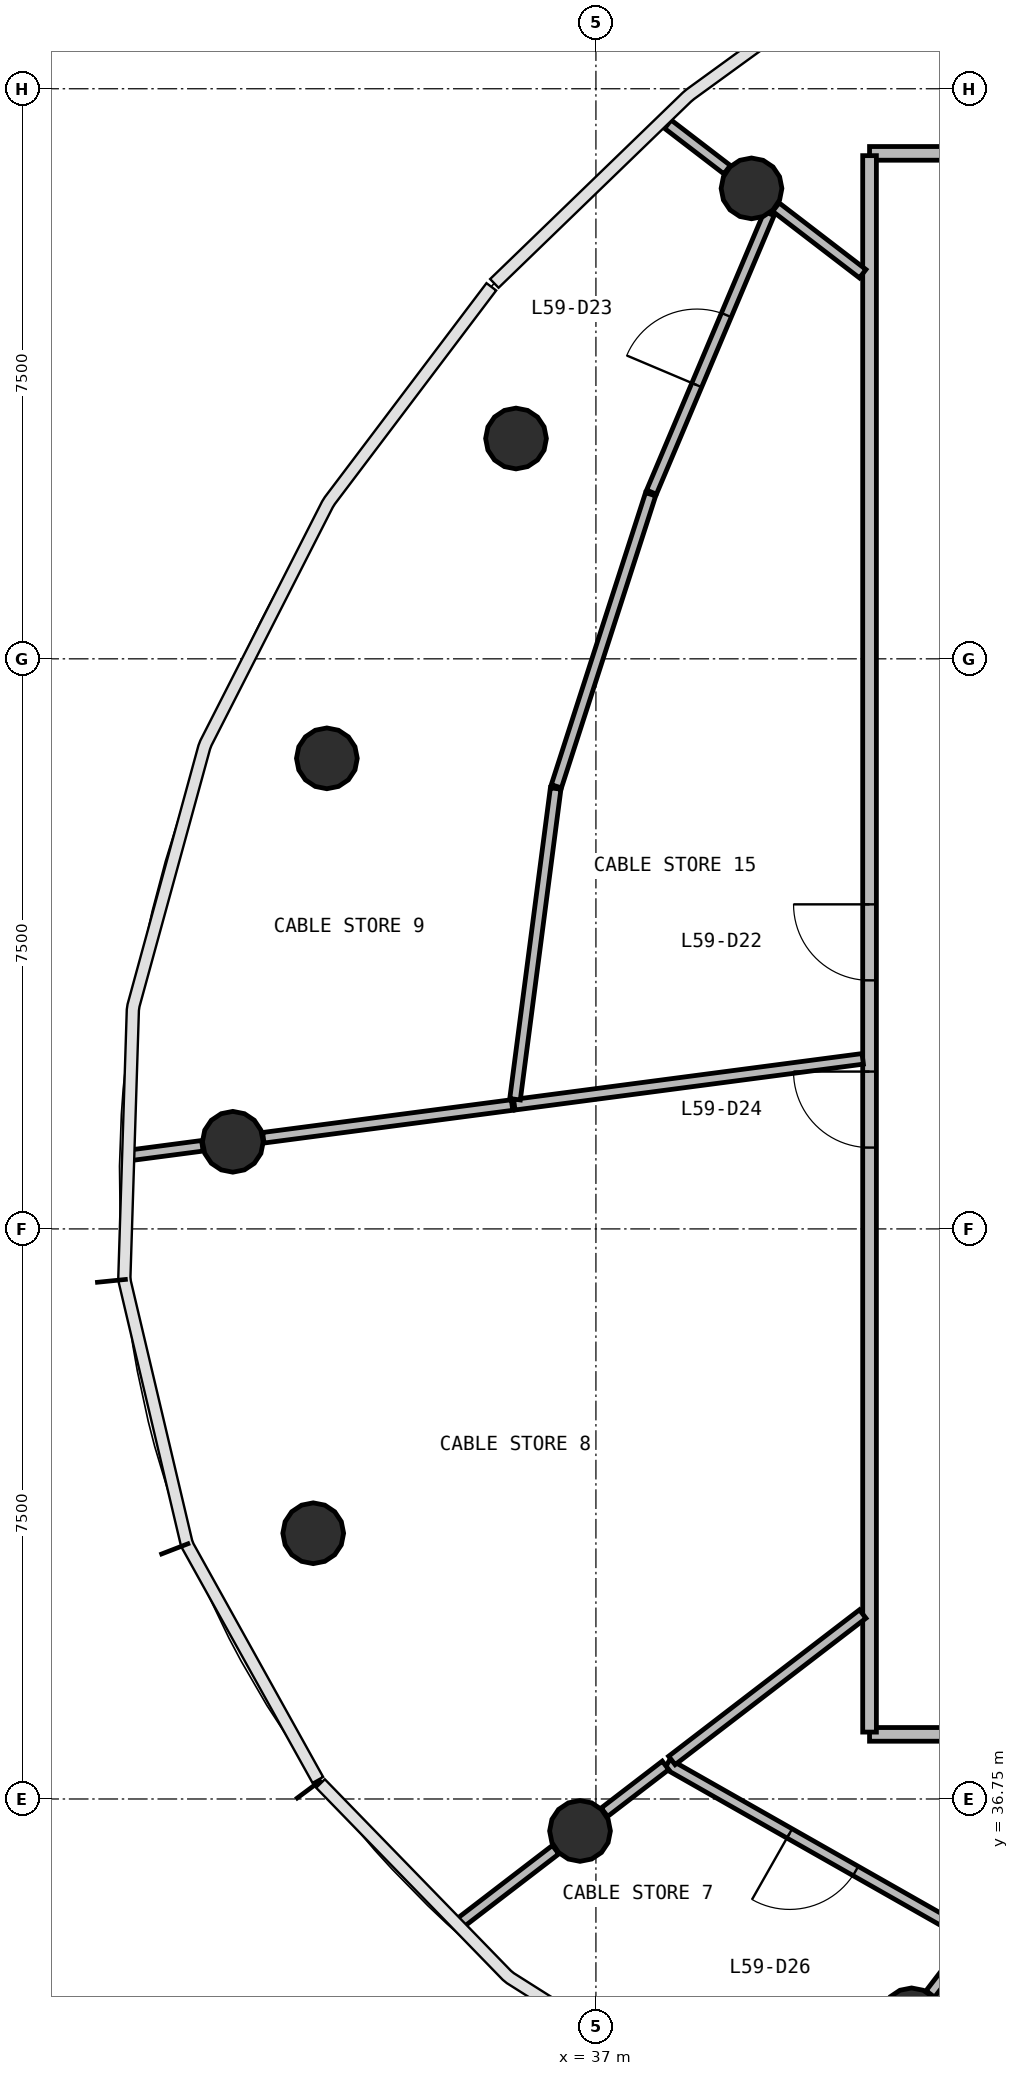
"""IFC4 building model, lengths in metres.
Left out: names, types, materials, properties, quantities, classifications, styles, units other than length and angle.
Written with IfcOpenShell. Run it as: python <this file> out.ifc"""

import sys

from ifc_helpers import new_model, si_unit, direction, frame, frame_2d, origin, origin_2d, place, context, subcontext, project, spatial, rectangle, circle, extrude, source, transform, mapped, element, fill, save


model = new_model("IFC4")
c1 = context("Model", 3, precision=1e-05, world=origin(), true_north=direction((0.0, 1.0)))
c2 = subcontext(c1, "Body", "Model", "MODEL_VIEW")
j1 = project(units=[si_unit("LENGTHUNIT", "METRE"), si_unit("PLANEANGLEUNIT", "RADIAN")], contexts=[c1])
p1 = place(None, origin())
s1 = spatial("IfcSite", under=j1, at=p1, CompositionType="ELEMENT")
p2 = place(p1, origin())
s2 = spatial("IfcBuilding", under=s1, at=p2, CompositionType="ELEMENT")
p3 = place(p2, frame((0.0, 0.0, 242.3)))
s3 = spatial("IfcBuildingStorey", under=s2, at=p3, CompositionType="ELEMENT", Elevation=242.3)
m1 = source(origin(), c2, "Body", "SweptSolid", [
    extrude(circle(Radius=0.4, at=origin_2d()), origin(), (0.0, 0.0, 1.0), 3.9),
])
for number, where, z_axis, x_axis in (
    (1, (39.047, 57.939, 0.0), (0.0, 0.0, 1.0), (1.0, 0.0, 0.0)),
    (2, (35.948, 54.649, 0.0), (0.0, 0.0, 1.0), (1.0, 0.0, 0.0)),
    (3, (33.46, 50.441, 0.0), (0.0, 0.0, 1.0), (1.0, 0.0, 0.0)),
    (4, (32.223, 45.396, 0.0), (0.0, 0.0, 1.0), (1.0, 0.0, 0.0)),
    (5, (33.281, 40.246, 0.0), (0.0, 0.0, 1.0), (1.0, 0.0, 0.0)),
    (6, (36.791, 36.329, 0.0), (0.0, 0.0, 1.0), (1.0, 0.0, 0.0)),
    (7, (41.153, 33.864, 0.0), (0.0, 0.0, 1.0), (1.0, 0.0, 0.0)),
):
    element("IfcColumn", number, at=place(p3, frame(where, z_axis=z_axis, x_axis=x_axis)), inside=s3, PredefinedType="COLUMN", context=c2, shape_type="MappedRepresentation", body=[
        mapped(m1, transform((0.0, 0.0, 0.0), scale=1.0)),
    ])
p4 = place(p3, frame((40.6, 58.4, 0.0), z_axis=(0.0, 0.0, 1.0), x_axis=(1.0, 0.0, 0.0)))
e8 = element("IfcWall", 8, at=p4, inside=s3, PredefinedType="PARTITIONING", context=c2, shape_type="SweptSolid", body=[
    extrude(rectangle(XDim=22.8, YDim=0.18, at=frame_2d((11.4, 0.0))), origin(), (0.0, 0.0, 1.0), 2.88),
])
p5 = place(p4, frame((10.85, 0.0, 0.0)))
e9 = element("IfcOpeningElement", 9, at=p5, cuts=e8, PredefinedType="OPENING", context=c2, shape_type="SweptSolid", body=[
    extrude(rectangle(XDim=0.9, YDim=2.1, at=frame_2d((0.45, 1.05))), frame((0.0, 0.1, 0.0), z_axis=(0.0, -1.0, 0.0), x_axis=(1.0, 0.0, 0.0)), (0.0, 0.0, 1.0), 0.2),
])
p6 = place(p4, frame((8.85, 0.0, 0.0)))
e10 = element("IfcOpeningElement", 10, at=p6, cuts=e8, PredefinedType="OPENING", context=c2, shape_type="SweptSolid", body=[
    extrude(rectangle(XDim=0.9, YDim=2.1, at=frame_2d((0.45, 1.05))), frame((0.0, 0.1, 0.0), z_axis=(0.0, -1.0, 0.0), x_axis=(1.0, 0.0, 0.0)), (0.0, 0.0, 1.0), 0.2),
])
p7 = place(p4, frame((5.75, 0.0, 0.0)))
e11 = element("IfcOpeningElement", 11, at=p7, cuts=e8, PredefinedType="OPENING", context=c2, shape_type="SweptSolid", body=[
    extrude(rectangle(XDim=1.0, YDim=2.1, at=frame_2d((0.5, 1.05))), frame((0.0, 0.1, 0.0), z_axis=(0.0, -1.0, 0.0), x_axis=(1.0, 0.0, 0.0)), (0.0, 0.0, 1.0), 0.2),
])
p8 = place(p4, frame((19.95, 0.0, 0.0)))
e12 = element("IfcOpeningElement", 12, at=p8, cuts=e8, PredefinedType="OPENING", context=c2, shape_type="SweptSolid", body=[
    extrude(rectangle(XDim=1.0, YDim=2.1, at=frame_2d((0.5, 1.05))), frame((0.0, 0.1, 0.0), z_axis=(0.0, -1.0, 0.0), x_axis=(1.0, 0.0, 0.0)), (0.0, 0.0, 1.0), 0.2),
])
p9 = place(p4, frame((12.95, 0.0, 0.0)))
e13 = element("IfcOpeningElement", 13, at=p9, cuts=e8, PredefinedType="OPENING", context=c2, shape_type="SweptSolid", body=[
    extrude(rectangle(XDim=1.0, YDim=2.1, at=frame_2d((0.5, 1.05))), frame((0.0, 0.1, 0.0), z_axis=(0.0, -1.0, 0.0), x_axis=(1.0, 0.0, 0.0)), (0.0, 0.0, 1.0), 0.2),
])
p10 = place(p3, frame((63.4, 37.6, 0.0), z_axis=(0.0, 0.0, 1.0), x_axis=(-1.0, 0.0, 0.0)))
e14 = element("IfcWall", 14, at=p10, inside=s3, PredefinedType="PARTITIONING", context=c2, shape_type="SweptSolid", body=[
    extrude(rectangle(XDim=22.8, YDim=0.18, at=frame_2d((11.4, 0.0))), origin(), (0.0, 0.0, 1.0), 2.88),
])
p11 = place(p10, frame((10.95, 0.0, 0.0)))
e15 = element("IfcOpeningElement", 15, at=p11, cuts=e14, PredefinedType="OPENING", context=c2, shape_type="SweptSolid", body=[
    extrude(rectangle(XDim=1.0, YDim=2.1, at=frame_2d((0.5, 1.05))), frame((0.0, 0.1, 0.0), z_axis=(0.0, -1.0, 0.0), x_axis=(1.0, 0.0, 0.0)), (0.0, 0.0, 1.0), 0.2),
])
p12 = place(p10, frame((8.75, 0.0, 0.0)))
e16 = element("IfcOpeningElement", 16, at=p12, cuts=e14, PredefinedType="OPENING", context=c2, shape_type="SweptSolid", body=[
    extrude(rectangle(XDim=1.0, YDim=2.1, at=frame_2d((0.5, 1.05))), frame((0.0, 0.1, 0.0), z_axis=(0.0, -1.0, 0.0), x_axis=(1.0, 0.0, 0.0)), (0.0, 0.0, 1.0), 0.2),
])
p13 = place(p3, frame((40.6, 37.63, 0.0), z_axis=(0.0, 0.0, 1.0), x_axis=(0.0, 1.0, 0.0)))
e17 = element("IfcWall", 17, at=p13, inside=s3, PredefinedType="PARTITIONING", context=c2, shape_type="SweptSolid", body=[
    extrude(rectangle(XDim=20.74, YDim=0.18, at=frame_2d((10.37, 0.0))), origin(), (0.0, 0.0, 1.0), 2.88),
])
p14 = place(p13, frame((9.89, 0.0, 0.0)))
e18 = element("IfcOpeningElement", 18, at=p14, cuts=e17, PredefinedType="OPENING", context=c2, shape_type="SweptSolid", body=[
    extrude(rectangle(XDim=1.0, YDim=2.1, at=frame_2d((0.5, 1.05))), frame((0.0, 0.1, 0.0), z_axis=(0.0, -1.0, 0.0), x_axis=(1.0, 0.0, 0.0)), (0.0, 0.0, 1.0), 0.2),
])
p15 = place(p13, frame((7.69, 0.0, 0.0)))
e19 = element("IfcOpeningElement", 19, at=p15, cuts=e17, PredefinedType="OPENING", context=c2, shape_type="SweptSolid", body=[
    extrude(rectangle(XDim=1.0, YDim=2.1, at=frame_2d((0.5, 1.05))), frame((0.0, 0.1, 0.0), z_axis=(0.0, -1.0, 0.0), x_axis=(1.0, 0.0, 0.0)), (0.0, 0.0, 1.0), 0.2),
])
p16 = place(p3, frame((40.51, 46.487, 0.0), z_axis=(0.0, 0.0, 1.0), x_axis=(-0.991443328118, -0.130537837928, 0.0)))
e20 = element("IfcWall", 20, at=p16, inside=s3, PredefinedType="PARTITIONING", context=c2, shape_type="SweptSolid", body=[
    extrude(rectangle(XDim=4.623, YDim=0.14, at=frame_2d((2.312, 0.0))), origin(), (0.0, 0.0, 1.0), 2.88),
])
p17 = place(p3, frame((41.966, 34.923, 0.0), z_axis=(0.0, 0.0, 1.0), x_axis=(-0.869515217262, 0.493906151966, 0.0)))
e21 = element("IfcWall", 21, at=p17, inside=s3, PredefinedType="PARTITIONING", context=c2, shape_type="SweptSolid", body=[
    extrude(rectangle(XDim=4.631, YDim=0.14, at=frame_2d((2.315, 0.0))), origin(), (0.0, 0.0, 1.0), 2.88),
])
p18 = place(p17, frame((1.781, 0.0, 0.0)))
e22 = element("IfcOpeningElement", 22, at=p18, cuts=e21, PredefinedType="OPENING", context=c2, shape_type="SweptSolid", body=[
    extrude(rectangle(XDim=1.0, YDim=2.1, at=frame_2d((0.5, 1.05))), frame((0.0, 0.08, 0.0), z_axis=(0.0, -1.0, 0.0), x_axis=(1.0, 0.0, 0.0)), (0.0, 0.0, 1.0), 0.16),
])
p19 = place(p3, frame((36.47, 50.044, 0.0), z_axis=(0.0, 0.0, 1.0), x_axis=(-0.12966570193, -0.991557767224, 0.0)))
e23 = element("IfcWall", 23, at=p19, inside=s3, PredefinedType="PARTITIONING", context=c2, shape_type="SweptSolid", body=[
    extrude(rectangle(XDim=4.124, YDim=0.14, at=frame_2d((2.062, 0.0))), origin(), (0.0, 0.0, 1.0), 2.88),
])
p20 = place(p3, frame((37.719, 53.915, 0.0), z_axis=(0.0, 0.0, 1.0), x_axis=(-0.307124685322, -0.951669284818, 0.0)))
e24 = element("IfcWall", 24, at=p20, inside=s3, PredefinedType="PARTITIONING", context=c2, shape_type="SweptSolid", body=[
    extrude(rectangle(XDim=4.037, YDim=0.14, at=frame_2d((2.019, 0.0))), origin(), (0.0, 0.0, 1.0), 2.88),
])
p21 = place(p3, frame((37.731, 53.943, 0.0), z_axis=(0.0, 0.0, 1.0), x_axis=(0.389219643962, 0.921144977055, 0.0)))
e25 = element("IfcWall", 25, at=p21, inside=s3, PredefinedType="PARTITIONING", context=c2, shape_type="SweptSolid", body=[
    extrude(rectangle(XDim=3.979, YDim=0.14, at=frame_2d((1.99, 0.0))), origin(), (0.0, 0.0, 1.0), 2.88),
])
p22 = place(p21, frame((1.53, 0.0, 0.0)))
e26 = element("IfcOpeningElement", 26, at=p22, cuts=e25, PredefinedType="OPENING", context=c2, shape_type="SweptSolid", body=[
    extrude(rectangle(XDim=1.0, YDim=2.1, at=frame_2d((0.5, 1.05))), frame((0.0, 0.08, 0.0), z_axis=(0.0, -1.0, 0.0), x_axis=(1.0, 0.0, 0.0)), (0.0, 0.0, 1.0), 0.16),
])
p23 = place(p3, frame((40.51, 39.183, 0.0), z_axis=(0.0, 0.0, 1.0), x_axis=(-0.793360447036, -0.608752167207, 0.0)))
e27 = element("IfcWall", 27, at=p23, inside=s3, PredefinedType="PARTITIONING", context=c2, shape_type="SweptSolid", body=[
    extrude(rectangle(XDim=3.165, YDim=0.14, at=frame_2d((1.583, 0.0))), origin(), (0.0, 0.0, 1.0), 2.88),
])
p24 = place(p3, frame((35.896, 45.88, 0.0), z_axis=(0.0, 0.0, 1.0), x_axis=(-0.991452533268, -0.130467905161, 0.0)))
e28 = element("IfcWall", 28, at=p24, inside=s3, PredefinedType="PARTITIONING", context=c2, shape_type="SweptSolid", body=[
    extrude(rectangle(XDim=3.301, YDim=0.14, at=frame_2d((1.65, 0.0))), origin(), (0.0, 0.0, 1.0), 2.88),
])
p25 = place(p3, frame((36.469, 36.083, 0.0), z_axis=(0.0, 0.0, 1.0), x_axis=(-0.793355628453, -0.608758447006, 0.0)))
e29 = element("IfcWall", 29, at=p25, inside=s3, PredefinedType="PARTITIONING", context=c2, shape_type="SweptSolid", body=[
    extrude(rectangle(XDim=1.599, YDim=0.14, at=frame_2d((0.799, 0.0))), origin(), (0.0, 0.0, 1.0), 2.88),
])
p26 = place(p3, frame((40.51, 56.817, 0.0), z_axis=(0.0, 0.0, 1.0), x_axis=(-0.793316945216, 0.608808857059, 0.0)))
e30 = element("IfcWall", 30, at=p26, inside=s3, PredefinedType="PARTITIONING", context=c2, shape_type="SweptSolid", body=[
    extrude(rectangle(XDim=1.44, YDim=0.14, at=frame_2d((0.72, 0.0))), origin(), (0.0, 0.0, 1.0), 2.88),
])
p27 = place(p3, frame((37.915, 37.192, 0.0), z_axis=(0.0, 0.0, 1.0), x_axis=(-0.793358047676, -0.608755294177, 0.0)))
e31 = element("IfcWall", 31, at=p27, inside=s3, PredefinedType="PARTITIONING", context=c2, shape_type="SweptSolid", body=[
    extrude(rectangle(XDim=1.013, YDim=0.14, at=frame_2d((0.506, 0.0))), origin(), (0.0, 0.0, 1.0), 2.88),
])
p28 = place(p3, frame((31.822, 45.344, 0.0), z_axis=(0.0, 0.0, 1.0), x_axis=(-0.991428116695, -0.130653317704, 0.0)))
e32 = element("IfcWall", 32, at=p28, inside=s3, PredefinedType="PARTITIONING", context=c2, shape_type="SweptSolid", body=[
    extrude(rectangle(XDim=0.985, YDim=0.14, at=frame_2d((0.492, 0.0))), origin(), (0.0, 0.0, 1.0), 2.88),
])
p29 = place(p3, frame((38.726, 58.186, 0.0), z_axis=(0.0, 0.0, 1.0), x_axis=(-0.793454398597, 0.608629704622, 0.0)))
e33 = element("IfcWall", 33, at=p29, inside=s3, PredefinedType="PARTITIONING", context=c2, shape_type="SweptSolid", body=[
    extrude(rectangle(XDim=0.983, YDim=0.14, at=frame_2d((0.491, 0.0))), origin(), (0.0, 0.0, 1.0), 2.88),
])
p30 = place(p3, frame((41.923, 34.867, 0.0), z_axis=(0.0, 0.0, 1.0), x_axis=(-0.608777226721, -0.793341218031, 0.0)))
e34 = element("IfcWall", 34, at=p30, inside=s3, PredefinedType="PARTITIONING", context=c2, shape_type="SweptSolid", body=[
    extrude(rectangle(XDim=0.86, YDim=0.14, at=frame_2d((0.43, 0.0))), origin(), (0.0, 0.0, 1.0), 2.88),
])
m2 = source(origin(), c2, "Body", "SweptSolid", [
    extrude(rectangle(XDim=1.0, YDim=2.1, at=frame_2d((0.5, 1.05))), frame((0.0, 0.025, 0.0), z_axis=(0.0, -1.0, 0.0), x_axis=(1.0, 0.0, 0.0)), (0.0, 0.0, 1.0), 0.05),
])
p31 = place(p14, origin())
e35 = element("IfcDoor", 35, at=p31, inside=s3, OperationType="SINGLE_SWING_RIGHT", PredefinedType="DOOR", context=c2, shape_type="MappedRepresentation", body=[
    mapped(m2, transform((0.0, 0.0, 0.0), scale=1.0)),
])
fill(e18, e35)
p32 = place(p22, origin())
e36 = element("IfcDoor", 36, at=p32, inside=s3, OperationType="SINGLE_SWING_LEFT", PredefinedType="DOOR", context=c2, shape_type="MappedRepresentation", body=[
    mapped(m2, transform((0.0, 0.0, 0.0), scale=1.0)),
])
fill(e26, e36)
p33 = place(p15, origin())
e37 = element("IfcDoor", 37, at=p33, inside=s3, OperationType="SINGLE_SWING_RIGHT", PredefinedType="DOOR", context=c2, shape_type="MappedRepresentation", body=[
    mapped(m2, transform((0.0, 0.0, 0.0), scale=1.0)),
])
fill(e19, e37)
p34 = place(p18, origin())
e38 = element("IfcDoor", 38, at=p34, inside=s3, OperationType="SINGLE_SWING_RIGHT", PredefinedType="DOOR", context=c2, shape_type="MappedRepresentation", body=[
    mapped(m2, transform((0.0, 0.0, 0.0), scale=1.0)),
])
fill(e22, e38)
save(model, sys.argv[1])
